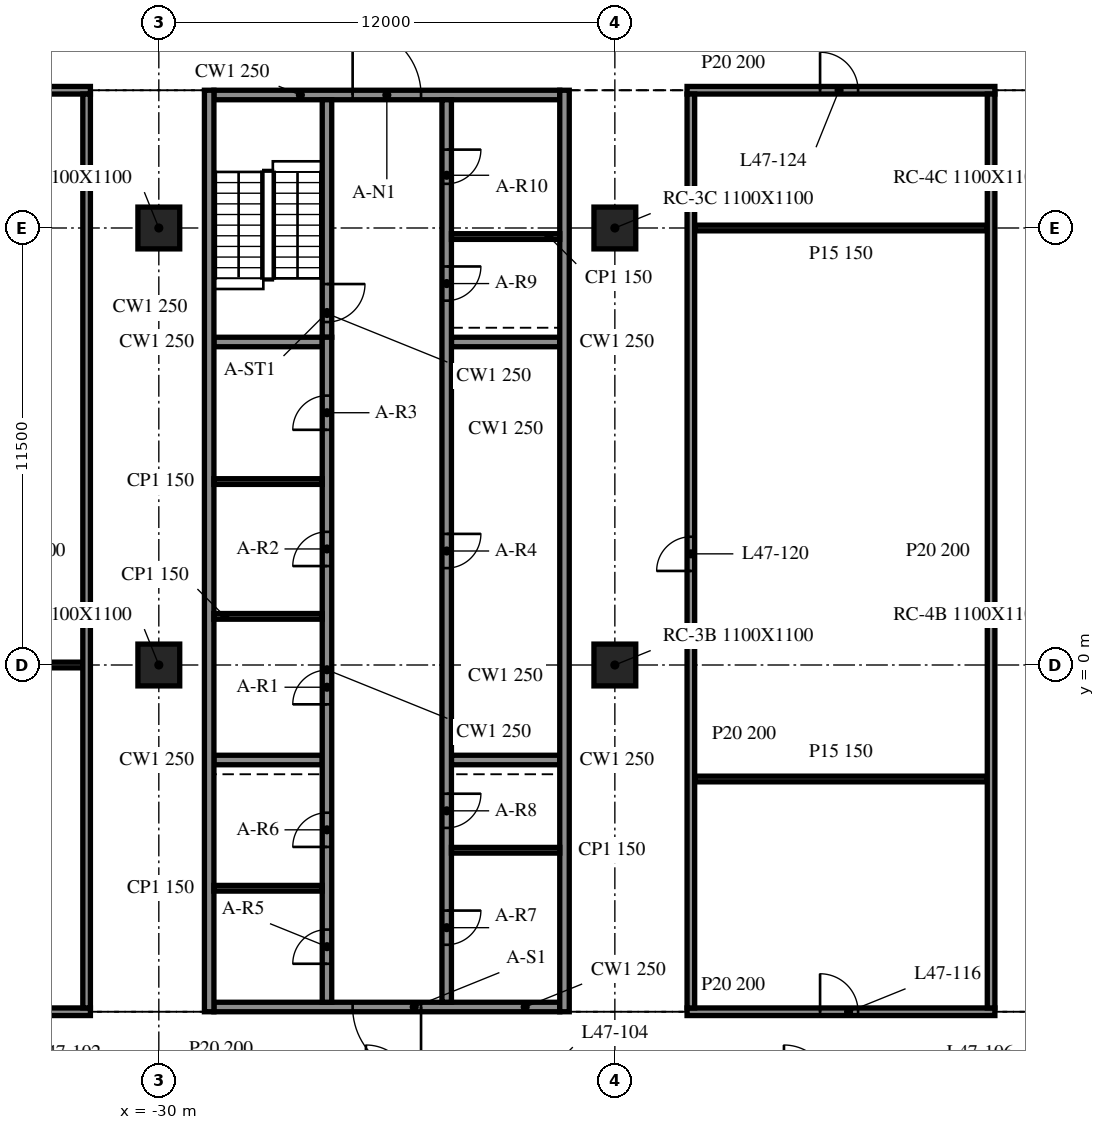
"""IFC4 building model, lengths in metres.
Left out: names, types, materials, properties, quantities, classifications, styles, units other than length and angle.
Written with IfcOpenShell. Run it as: python <this file> out.ifc"""

import sys

from ifc_helpers import new_model, si_unit, direction, frame, frame_2d, origin, origin_2d, place, context, subcontext, project, spatial, rectangle, extrude, element, fill, save


model = new_model("IFC4")
c1 = context("Model", 3, precision=1e-05, world=origin(), true_north=direction((0.0, 1.0)))
c2 = subcontext(c1, "Body", "Model", "MODEL_VIEW")
j1 = project(units=[si_unit("LENGTHUNIT", "METRE"), si_unit("PLANEANGLEUNIT", "RADIAN")], contexts=[c1])
p1 = place(None, origin())
s1 = spatial("IfcSite", under=j1, at=p1, CompositionType="ELEMENT")
p2 = place(p1, origin())
s2 = spatial("IfcBuilding", under=s1, at=p2, CompositionType="ELEMENT")
p3 = place(p2, frame((0.0, 0.0, 197.7)))
s3 = spatial("IfcBuildingStorey", under=s2, at=p3, CompositionType="ELEMENT", Elevation=197.7)
for number, where, z_axis, x_axis in (
    (1, (-30.0, 0.0, -0.34), (0.0, 0.0, 1.0), (1.0, 0.0, 0.0)),
    (2, (-30.0, 11.5, -0.34), (0.0, 0.0, 1.0), (1.0, 0.0, 0.0)),
    (3, (-18.0, 0.0, -0.34), (0.0, 0.0, 1.0), (1.0, 0.0, 0.0)),
    (4, (-18.0, 11.5, -0.34), (0.0, 0.0, 1.0), (1.0, 0.0, 0.0)),
):
    element("IfcColumn", number, at=place(p3, frame(where, z_axis=z_axis, x_axis=x_axis)), inside=s3, PredefinedType="COLUMN", context=c2, shape_type="SweptSolid", body=[
        extrude(rectangle(XDim=1.1, YDim=1.1, at=origin_2d()), origin(), (0.0, 0.0, 1.0), 3.8),
    ])
for number, where, z_axis, x_axis in (
    (5, (-28.675, 15.125, 0.0), (0.0, 0.0, 1.0), (0.0, -1.0, 0.0)),
    (6, (-19.325, -9.125, 0.0), (0.0, 0.0, 1.0), (0.0, 1.0, 0.0)),
):
    element("IfcWall", number, at=place(p3, frame(where, z_axis=z_axis, x_axis=x_axis)), inside=s3, PredefinedType="SOLIDWALL", context=c2, shape_type="SweptSolid", body=[
        extrude(rectangle(XDim=24.25, YDim=0.25, at=frame_2d((12.125, 0.0))), origin(), (0.0, 0.0, 1.0), 3.46),
    ])
p4 = place(p3, frame((-19.45, -9.0, 0.0), z_axis=(0.0, 0.0, 1.0), x_axis=(-1.0, 0.0, 0.0)))
e7 = element("IfcWall", 7, at=p4, inside=s3, PredefinedType="SOLIDWALL", context=c2, shape_type="SweptSolid", body=[
    extrude(rectangle(XDim=9.1, YDim=0.25, at=frame_2d((4.55, 0.0))), origin(), (0.0, 0.0, 1.0), 3.46),
])
p5 = place(p4, frame((3.65, 0.0, 0.0)))
e8 = element("IfcOpeningElement", 8, at=p5, cuts=e7, PredefinedType="OPENING", context=c2, shape_type="SweptSolid", body=[
    extrude(rectangle(XDim=1.8, YDim=2.1, at=frame_2d((0.9, 1.05))), frame((0.0, 0.135, 0.0), z_axis=(0.0, -1.0, 0.0), x_axis=(1.0, 0.0, 0.0)), (0.0, 0.0, 1.0), 0.27),
])
p6 = place(p3, frame((-28.55, 15.0, 0.0), z_axis=(0.0, 0.0, 1.0), x_axis=(1.0, 0.0, 0.0)))
e9 = element("IfcWall", 9, at=p6, inside=s3, PredefinedType="SOLIDWALL", context=c2, shape_type="SweptSolid", body=[
    extrude(rectangle(XDim=9.1, YDim=0.25, at=frame_2d((4.55, 0.0))), origin(), (0.0, 0.0, 1.0), 3.46),
])
p7 = place(p6, frame((3.65, 0.0, 0.0)))
e10 = element("IfcOpeningElement", 10, at=p7, cuts=e9, PredefinedType="OPENING", context=c2, shape_type="SweptSolid", body=[
    extrude(rectangle(XDim=1.8, YDim=2.1, at=frame_2d((0.9, 1.05))), frame((0.0, 0.135, 0.0), z_axis=(0.0, -1.0, 0.0), x_axis=(1.0, 0.0, 0.0)), (0.0, 0.0, 1.0), 0.27),
])
p8 = place(p3, frame((-25.575, -8.875, 0.0), z_axis=(0.0, 0.0, 1.0), x_axis=(0.0, 1.0, 0.0)))
e11 = element("IfcWall", 11, at=p8, inside=s3, PredefinedType="SOLIDWALL", context=c2, shape_type="SweptSolid", body=[
    extrude(rectangle(XDim=17.5, YDim=0.25, at=frame_2d((8.75, 0.0))), origin(), (0.0, 0.0, 1.0), 3.46),
])
p9 = place(p8, frame((7.84, 0.0, 0.0)))
e12 = element("IfcOpeningElement", 12, at=p9, cuts=e11, PredefinedType="OPENING", context=c2, shape_type="SweptSolid", body=[
    extrude(rectangle(XDim=0.9, YDim=2.1, at=frame_2d((0.45, 1.05))), frame((0.0, 0.135, 0.0), z_axis=(0.0, -1.0, 0.0), x_axis=(1.0, 0.0, 0.0)), (0.0, 0.0, 1.0), 0.27),
])
p10 = place(p8, frame((11.479, 0.0, 0.0)))
e13 = element("IfcOpeningElement", 13, at=p10, cuts=e11, PredefinedType="OPENING", context=c2, shape_type="SweptSolid", body=[
    extrude(rectangle(XDim=0.9, YDim=2.1, at=frame_2d((0.45, 1.05))), frame((0.0, 0.135, 0.0), z_axis=(0.0, -1.0, 0.0), x_axis=(1.0, 0.0, 0.0)), (0.0, 0.0, 1.0), 0.27),
])
p11 = place(p8, frame((15.064, 0.0, 0.0)))
e14 = element("IfcOpeningElement", 14, at=p11, cuts=e11, PredefinedType="OPENING", context=c2, shape_type="SweptSolid", body=[
    extrude(rectangle(XDim=0.9, YDim=2.1, at=frame_2d((0.45, 1.05))), frame((0.0, 0.135, 0.0), z_axis=(0.0, -1.0, 0.0), x_axis=(1.0, 0.0, 0.0)), (0.0, 0.0, 1.0), 0.27),
])
p12 = place(p8, frame((1.012, 0.0, 0.0)))
e15 = element("IfcOpeningElement", 15, at=p12, cuts=e11, PredefinedType="OPENING", context=c2, shape_type="SweptSolid", body=[
    extrude(rectangle(XDim=0.9, YDim=2.1, at=frame_2d((0.45, 1.05))), frame((0.0, 0.135, 0.0), z_axis=(0.0, -1.0, 0.0), x_axis=(1.0, 0.0, 0.0)), (0.0, 0.0, 1.0), 0.27),
])
p13 = place(p8, frame((4.087, 0.0, 0.0)))
e16 = element("IfcOpeningElement", 16, at=p13, cuts=e11, PredefinedType="OPENING", context=c2, shape_type="SweptSolid", body=[
    extrude(rectangle(XDim=0.9, YDim=2.1, at=frame_2d((0.45, 1.05))), frame((0.0, 0.135, 0.0), z_axis=(0.0, -1.0, 0.0), x_axis=(1.0, 0.0, 0.0)), (0.0, 0.0, 1.0), 0.27),
])
p14 = place(p3, frame((-25.575, 14.875, 0.0), z_axis=(0.0, 0.0, 1.0), x_axis=(0.0, -1.0, 0.0)))
e17 = element("IfcWall", 17, at=p14, inside=s3, PredefinedType="SOLIDWALL", context=c2, shape_type="SweptSolid", body=[
    extrude(rectangle(XDim=6.25, YDim=0.25, at=frame_2d((3.125, 0.0))), origin(), (0.0, 0.0, 1.0), 3.46),
])
p15 = place(p14, frame((4.85, 0.0, 0.0)))
e18 = element("IfcOpeningElement", 18, at=p15, cuts=e17, PredefinedType="OPENING", context=c2, shape_type="SweptSolid", body=[
    extrude(rectangle(XDim=1.0, YDim=2.1, at=frame_2d((0.5, 1.05))), frame((0.0, 0.135, 0.0), z_axis=(0.0, -1.0, 0.0), x_axis=(1.0, 0.0, 0.0)), (0.0, 0.0, 1.0), 0.27),
])
p16 = place(p3, frame((-22.425, 14.875, 0.0), z_axis=(0.0, 0.0, 1.0), x_axis=(0.0, -1.0, 0.0)))
e19 = element("IfcWall", 19, at=p16, inside=s3, PredefinedType="SOLIDWALL", context=c2, shape_type="SweptSolid", body=[
    extrude(rectangle(XDim=23.75, YDim=0.25, at=frame_2d((11.875, 0.0))), origin(), (0.0, 0.0, 1.0), 3.46),
])
p17 = place(p16, frame((11.425, 0.0, 0.0)))
e20 = element("IfcOpeningElement", 20, at=p17, cuts=e19, PredefinedType="OPENING", context=c2, shape_type="SweptSolid", body=[
    extrude(rectangle(XDim=0.9, YDim=2.1, at=frame_2d((0.45, 1.05))), frame((0.0, 0.135, 0.0), z_axis=(0.0, -1.0, 0.0), x_axis=(1.0, 0.0, 0.0)), (0.0, 0.0, 1.0), 0.27),
])
p18 = place(p16, frame((21.337, 0.0, 0.0)))
e21 = element("IfcOpeningElement", 21, at=p18, cuts=e19, PredefinedType="OPENING", context=c2, shape_type="SweptSolid", body=[
    extrude(rectangle(XDim=0.9, YDim=2.1, at=frame_2d((0.45, 1.05))), frame((0.0, 0.135, 0.0), z_axis=(0.0, -1.0, 0.0), x_axis=(1.0, 0.0, 0.0)), (0.0, 0.0, 1.0), 0.27),
])
p19 = place(p16, frame((18.262, 0.0, 0.0)))
e22 = element("IfcOpeningElement", 22, at=p19, cuts=e19, PredefinedType="OPENING", context=c2, shape_type="SweptSolid", body=[
    extrude(rectangle(XDim=0.9, YDim=2.1, at=frame_2d((0.45, 1.05))), frame((0.0, 0.135, 0.0), z_axis=(0.0, -1.0, 0.0), x_axis=(1.0, 0.0, 0.0)), (0.0, 0.0, 1.0), 0.27),
])
p20 = place(p16, frame((4.387, 0.0, 0.0)))
e23 = element("IfcOpeningElement", 23, at=p20, cuts=e19, PredefinedType="OPENING", context=c2, shape_type="SweptSolid", body=[
    extrude(rectangle(XDim=0.9, YDim=2.1, at=frame_2d((0.45, 1.05))), frame((0.0, 0.135, 0.0), z_axis=(0.0, -1.0, 0.0), x_axis=(1.0, 0.0, 0.0)), (0.0, 0.0, 1.0), 0.27),
])
p21 = place(p16, frame((1.312, 0.0, 0.0)))
e24 = element("IfcOpeningElement", 24, at=p21, cuts=e19, PredefinedType="OPENING", context=c2, shape_type="SweptSolid", body=[
    extrude(rectangle(XDim=0.9, YDim=2.1, at=frame_2d((0.45, 1.05))), frame((0.0, 0.135, 0.0), z_axis=(0.0, -1.0, 0.0), x_axis=(1.0, 0.0, 0.0)), (0.0, 0.0, 1.0), 0.27),
])
for number, where, z_axis, x_axis in (
    (25, (-28.55, -2.5, 0.0), (0.0, 0.0, 1.0), (1.0, 0.0, 0.0)),
    (26, (-28.55, 8.5, 0.0), (0.0, 0.0, 1.0), (1.0, 0.0, 0.0)),
    (27, (-22.3, -2.5, 0.0), (0.0, 0.0, 1.0), (1.0, 0.0, 0.0)),
    (28, (-22.3, 8.5, 0.0), (0.0, 0.0, 1.0), (1.0, 0.0, 0.0)),
):
    element("IfcWall", number, at=place(p3, frame(where, z_axis=z_axis, x_axis=x_axis)), inside=s3, PredefinedType="SOLIDWALL", context=c2, shape_type="SweptSolid", body=[
        extrude(rectangle(XDim=2.85, YDim=0.25, at=frame_2d((1.425, 0.0))), origin(), (0.0, 0.0, 1.0), 3.46),
    ])
for number, where, z_axis, x_axis in (
    (29, (-28.55, 1.28, 0.0), (0.0, 0.0, 1.0), (1.0, 0.0, 0.0)),
    (30, (-28.55, 4.827, 0.0), (0.0, 0.0, 1.0), (1.0, 0.0, 0.0)),
    (31, (-28.55, -5.875, 0.0), (0.0, 0.0, 1.0), (1.0, 0.0, 0.0)),
    (32, (-22.3, -4.875, 0.0), (0.0, 0.0, 1.0), (1.0, 0.0, 0.0)),
    (33, (-22.3, 11.275, 0.0), (0.0, 0.0, 1.0), (1.0, 0.0, 0.0)),
):
    element("IfcWall", number, at=place(p3, frame(where, z_axis=z_axis, x_axis=x_axis)), inside=s3, PredefinedType="PARTITIONING", context=c2, shape_type="SweptSolid", body=[
        extrude(rectangle(XDim=2.85, YDim=0.15, at=frame_2d((1.425, 0.0))), origin(), (0.0, 0.0, 1.0), 3.46),
    ])
p22 = place(p3, frame((-41.975, -9.125, 0.0), z_axis=(0.0, 0.0, 1.0), x_axis=(1.0, 0.0, 0.0)))
e34 = element("IfcWall", 34, at=p22, inside=s3, PredefinedType="PARTITIONING", context=c2, shape_type="SweptSolid", body=[
    extrude(rectangle(XDim=10.175, YDim=0.2, at=frame_2d((5.087, 0.0))), origin(), (0.0, 0.0, 1.0), 3.46),
])
p23 = place(p22, frame((4.5, 0.0, 0.0)))
e35 = element("IfcOpeningElement", 35, at=p23, cuts=e34, PredefinedType="OPENING", context=c2, shape_type="SweptSolid", body=[
    extrude(rectangle(XDim=1.2, YDim=2.1, at=frame_2d((0.6, 1.05))), frame((0.0, 0.11, 0.0), z_axis=(0.0, -1.0, 0.0), x_axis=(1.0, 0.0, 0.0)), (0.0, 0.0, 1.0), 0.22),
])
p24 = place(p3, frame((-16.1, -9.125, 0.0), z_axis=(0.0, 0.0, 1.0), x_axis=(1.0, 0.0, 0.0)))
e36 = element("IfcWall", 36, at=p24, inside=s3, PredefinedType="PARTITIONING", context=c2, shape_type="SweptSolid", body=[
    extrude(rectangle(XDim=8.1, YDim=0.2, at=frame_2d((4.05, 0.0))), origin(), (0.0, 0.0, 1.0), 3.46),
])
p25 = place(p24, frame((3.5, 0.0, 0.0)))
e37 = element("IfcOpeningElement", 37, at=p25, cuts=e36, PredefinedType="OPENING", context=c2, shape_type="SweptSolid", body=[
    extrude(rectangle(XDim=1.0, YDim=2.1, at=frame_2d((0.5, 1.05))), frame((0.0, 0.11, 0.0), z_axis=(0.0, -1.0, 0.0), x_axis=(1.0, 0.0, 0.0)), (0.0, 0.0, 1.0), 0.22),
])
p26 = place(p3, frame((-15.9, -3.0, 0.0), z_axis=(0.0, 0.0, 1.0), x_axis=(1.0, 0.0, 0.0)))
e38 = element("IfcWall", 38, at=p26, inside=s3, PredefinedType="PARTITIONING", context=c2, shape_type="SweptSolid", body=[
    extrude(rectangle(XDim=7.7, YDim=0.15, at=frame_2d((3.85, 0.0))), origin(), (0.0, 0.0, 1.0), 3.46),
])
p27 = place(p3, frame((-41.45, 0.0, 0.0), z_axis=(0.0, 0.0, 1.0), x_axis=(1.0, 0.0, 0.0)))
e39 = element("IfcWall", 39, at=p27, inside=s3, PredefinedType="PARTITIONING", context=c2, shape_type="SweptSolid", body=[
    extrude(rectangle(XDim=9.45, YDim=0.15, at=frame_2d((4.725, 0.0))), origin(), (0.0, 0.0, 1.0), 3.46),
])
p28 = place(p3, frame((-15.9, 11.5, 0.0), z_axis=(0.0, 0.0, 1.0), x_axis=(1.0, 0.0, 0.0)))
e40 = element("IfcWall", 40, at=p28, inside=s3, PredefinedType="PARTITIONING", context=c2, shape_type="SweptSolid", body=[
    extrude(rectangle(XDim=7.7, YDim=0.15, at=frame_2d((3.85, 0.0))), origin(), (0.0, 0.0, 1.0), 3.46),
])
p29 = place(p3, frame((-41.975, 15.125, 0.0), z_axis=(0.0, 0.0, 1.0), x_axis=(1.0, 0.0, 0.0)))
e41 = element("IfcWall", 41, at=p29, inside=s3, PredefinedType="PARTITIONING", context=c2, shape_type="SweptSolid", body=[
    extrude(rectangle(XDim=10.175, YDim=0.2, at=frame_2d((5.087, 0.0))), origin(), (0.0, 0.0, 1.0), 3.46),
])
p30 = place(p29, frame((4.5, 0.0, 0.0)))
e42 = element("IfcOpeningElement", 42, at=p30, cuts=e41, PredefinedType="OPENING", context=c2, shape_type="SweptSolid", body=[
    extrude(rectangle(XDim=1.0, YDim=2.1, at=frame_2d((0.5, 1.05))), frame((0.0, 0.11, 0.0), z_axis=(0.0, -1.0, 0.0), x_axis=(1.0, 0.0, 0.0)), (0.0, 0.0, 1.0), 0.22),
])
p31 = place(p3, frame((-16.1, 15.125, 0.0), z_axis=(0.0, 0.0, 1.0), x_axis=(1.0, 0.0, 0.0)))
e43 = element("IfcWall", 43, at=p31, inside=s3, PredefinedType="PARTITIONING", context=c2, shape_type="SweptSolid", body=[
    extrude(rectangle(XDim=8.1, YDim=0.2, at=frame_2d((4.05, 0.0))), origin(), (0.0, 0.0, 1.0), 3.46),
])
p32 = place(p31, frame((3.5, 0.0, 0.0)))
e44 = element("IfcOpeningElement", 44, at=p32, cuts=e43, PredefinedType="OPENING", context=c2, shape_type="SweptSolid", body=[
    extrude(rectangle(XDim=1.0, YDim=2.1, at=frame_2d((0.5, 1.05))), frame((0.0, 0.11, 0.0), z_axis=(0.0, -1.0, 0.0), x_axis=(1.0, 0.0, 0.0)), (0.0, 0.0, 1.0), 0.22),
])
p33 = place(p3, frame((-31.9, -9.025, 0.0), z_axis=(0.0, 0.0, 1.0), x_axis=(0.0, 1.0, 0.0)))
e45 = element("IfcWall", 45, at=p33, inside=s3, PredefinedType="PARTITIONING", context=c2, shape_type="SweptSolid", body=[
    extrude(rectangle(XDim=24.05, YDim=0.2, at=frame_2d((12.025, 0.0))), origin(), (0.0, 0.0, 1.0), 3.46),
])
p34 = place(p3, frame((-16.0, -9.025, 0.0), z_axis=(0.0, 0.0, 1.0), x_axis=(0.0, 1.0, 0.0)))
e46 = element("IfcWall", 46, at=p34, inside=s3, PredefinedType="PARTITIONING", context=c2, shape_type="SweptSolid", body=[
    extrude(rectangle(XDim=24.05, YDim=0.2, at=frame_2d((12.025, 0.0))), origin(), (0.0, 0.0, 1.0), 3.46),
])
p35 = place(p34, frame((11.5, 0.0, 0.0)))
e47 = element("IfcOpeningElement", 47, at=p35, cuts=e46, PredefinedType="OPENING", context=c2, shape_type="SweptSolid", body=[
    extrude(rectangle(XDim=0.9, YDim=2.1, at=frame_2d((0.45, 1.05))), frame((0.0, 0.11, 0.0), z_axis=(0.0, -1.0, 0.0), x_axis=(1.0, 0.0, 0.0)), (0.0, 0.0, 1.0), 0.22),
])
p36 = place(p3, frame((-8.1, -9.025, 0.0), z_axis=(0.0, 0.0, 1.0), x_axis=(0.0, 1.0, 0.0)))
e48 = element("IfcWall", 48, at=p36, inside=s3, PredefinedType="PARTITIONING", context=c2, shape_type="SweptSolid", body=[
    extrude(rectangle(XDim=24.05, YDim=0.2, at=frame_2d((12.025, 0.0))), origin(), (0.0, 0.0, 1.0), 3.46),
])
p37 = place(p5, origin())
e49 = element("IfcDoor", 49, at=p37, inside=s3, OperationType="DOUBLE_DOOR_SINGLE_SWING", PredefinedType="DOOR", context=c2, shape_type="SweptSolid", body=[
    extrude(rectangle(XDim=1.8, YDim=2.1, at=frame_2d((0.9, 1.05))), frame((0.0, 0.025, 0.0), z_axis=(0.0, -1.0, 0.0), x_axis=(1.0, 0.0, 0.0)), (0.0, 0.0, 1.0), 0.05),
])
fill(e8, e49)
p38 = place(p7, origin())
e50 = element("IfcDoor", 50, at=p38, inside=s3, OperationType="DOUBLE_DOOR_SINGLE_SWING", PredefinedType="DOOR", context=c2, shape_type="SweptSolid", body=[
    extrude(rectangle(XDim=1.8, YDim=2.1, at=frame_2d((0.9, 1.05))), frame((0.0, 0.025, 0.0), z_axis=(0.0, -1.0, 0.0), x_axis=(1.0, 0.0, 0.0)), (0.0, 0.0, 1.0), 0.05),
])
fill(e10, e50)
p39 = place(p9, origin())
e51 = element("IfcDoor", 51, at=p39, inside=s3, OperationType="SINGLE_SWING_LEFT", PredefinedType="DOOR", context=c2, shape_type="SweptSolid", body=[
    extrude(rectangle(XDim=0.9, YDim=2.1, at=frame_2d((0.45, 1.05))), frame((0.0, 0.025, 0.0), z_axis=(0.0, -1.0, 0.0), x_axis=(1.0, 0.0, 0.0)), (0.0, 0.0, 1.0), 0.05),
])
fill(e12, e51)
p40 = place(p10, origin())
e52 = element("IfcDoor", 52, at=p40, inside=s3, OperationType="SINGLE_SWING_RIGHT", PredefinedType="DOOR", context=c2, shape_type="SweptSolid", body=[
    extrude(rectangle(XDim=0.9, YDim=2.1, at=frame_2d((0.45, 1.05))), frame((0.0, 0.025, 0.0), z_axis=(0.0, -1.0, 0.0), x_axis=(1.0, 0.0, 0.0)), (0.0, 0.0, 1.0), 0.05),
])
fill(e13, e52)
p41 = place(p11, origin())
e53 = element("IfcDoor", 53, at=p41, inside=s3, OperationType="SINGLE_SWING_LEFT", PredefinedType="DOOR", context=c2, shape_type="SweptSolid", body=[
    extrude(rectangle(XDim=0.9, YDim=2.1, at=frame_2d((0.45, 1.05))), frame((0.0, 0.025, 0.0), z_axis=(0.0, -1.0, 0.0), x_axis=(1.0, 0.0, 0.0)), (0.0, 0.0, 1.0), 0.05),
])
fill(e14, e53)
p42 = place(p17, origin())
e54 = element("IfcDoor", 54, at=p42, inside=s3, OperationType="SINGLE_SWING_RIGHT", PredefinedType="DOOR", context=c2, shape_type="SweptSolid", body=[
    extrude(rectangle(XDim=0.9, YDim=2.1, at=frame_2d((0.45, 1.05))), frame((0.0, 0.025, 0.0), z_axis=(0.0, -1.0, 0.0), x_axis=(1.0, 0.0, 0.0)), (0.0, 0.0, 1.0), 0.05),
])
fill(e20, e54)
p43 = place(p12, origin())
e55 = element("IfcDoor", 55, at=p43, inside=s3, OperationType="SINGLE_SWING_LEFT", PredefinedType="DOOR", context=c2, shape_type="SweptSolid", body=[
    extrude(rectangle(XDim=0.9, YDim=2.1, at=frame_2d((0.45, 1.05))), frame((0.0, 0.025, 0.0), z_axis=(0.0, -1.0, 0.0), x_axis=(1.0, 0.0, 0.0)), (0.0, 0.0, 1.0), 0.05),
])
fill(e15, e55)
p44 = place(p13, origin())
e56 = element("IfcDoor", 56, at=p44, inside=s3, OperationType="SINGLE_SWING_RIGHT", PredefinedType="DOOR", context=c2, shape_type="SweptSolid", body=[
    extrude(rectangle(XDim=0.9, YDim=2.1, at=frame_2d((0.45, 1.05))), frame((0.0, 0.025, 0.0), z_axis=(0.0, -1.0, 0.0), x_axis=(1.0, 0.0, 0.0)), (0.0, 0.0, 1.0), 0.05),
])
fill(e16, e56)
p45 = place(p18, origin())
e57 = element("IfcDoor", 57, at=p45, inside=s3, OperationType="SINGLE_SWING_LEFT", PredefinedType="DOOR", context=c2, shape_type="SweptSolid", body=[
    extrude(rectangle(XDim=0.9, YDim=2.1, at=frame_2d((0.45, 1.05))), frame((0.0, 0.025, 0.0), z_axis=(0.0, -1.0, 0.0), x_axis=(1.0, 0.0, 0.0)), (0.0, 0.0, 1.0), 0.05),
])
fill(e21, e57)
p46 = place(p19, origin())
e58 = element("IfcDoor", 58, at=p46, inside=s3, OperationType="SINGLE_SWING_RIGHT", PredefinedType="DOOR", context=c2, shape_type="SweptSolid", body=[
    extrude(rectangle(XDim=0.9, YDim=2.1, at=frame_2d((0.45, 1.05))), frame((0.0, 0.025, 0.0), z_axis=(0.0, -1.0, 0.0), x_axis=(1.0, 0.0, 0.0)), (0.0, 0.0, 1.0), 0.05),
])
fill(e22, e58)
p47 = place(p20, origin())
e59 = element("IfcDoor", 59, at=p47, inside=s3, OperationType="SINGLE_SWING_LEFT", PredefinedType="DOOR", context=c2, shape_type="SweptSolid", body=[
    extrude(rectangle(XDim=0.9, YDim=2.1, at=frame_2d((0.45, 1.05))), frame((0.0, 0.025, 0.0), z_axis=(0.0, -1.0, 0.0), x_axis=(1.0, 0.0, 0.0)), (0.0, 0.0, 1.0), 0.05),
])
fill(e23, e59)
p48 = place(p21, origin())
e60 = element("IfcDoor", 60, at=p48, inside=s3, OperationType="SINGLE_SWING_RIGHT", PredefinedType="DOOR", context=c2, shape_type="SweptSolid", body=[
    extrude(rectangle(XDim=0.9, YDim=2.1, at=frame_2d((0.45, 1.05))), frame((0.0, 0.025, 0.0), z_axis=(0.0, -1.0, 0.0), x_axis=(1.0, 0.0, 0.0)), (0.0, 0.0, 1.0), 0.05),
])
fill(e24, e60)
p49 = place(p15, origin())
e61 = element("IfcDoor", 61, at=p49, inside=s3, OperationType="SINGLE_SWING_LEFT", PredefinedType="DOOR", context=c2, shape_type="SweptSolid", body=[
    extrude(rectangle(XDim=1.0, YDim=2.1, at=frame_2d((0.5, 1.05))), frame((0.0, 0.025, 0.0), z_axis=(0.0, -1.0, 0.0), x_axis=(1.0, 0.0, 0.0)), (0.0, 0.0, 1.0), 0.05),
])
fill(e18, e61)
p50 = place(p25, origin())
e62 = element("IfcDoor", 62, at=p50, inside=s3, OperationType="SINGLE_SWING_LEFT", PredefinedType="DOOR", context=c2, shape_type="SweptSolid", body=[
    extrude(rectangle(XDim=1.0, YDim=2.1, at=frame_2d((0.5, 1.05))), frame((0.0, 0.025, 0.0), z_axis=(0.0, -1.0, 0.0), x_axis=(1.0, 0.0, 0.0)), (0.0, 0.0, 1.0), 0.05),
])
fill(e37, e62)
p51 = place(p35, origin())
e63 = element("IfcDoor", 63, at=p51, inside=s3, OperationType="SINGLE_SWING_RIGHT", PredefinedType="DOOR", context=c2, shape_type="SweptSolid", body=[
    extrude(rectangle(XDim=0.9, YDim=2.1, at=frame_2d((0.45, 1.05))), frame((0.0, 0.025, 0.0), z_axis=(0.0, -1.0, 0.0), x_axis=(1.0, 0.0, 0.0)), (0.0, 0.0, 1.0), 0.05),
])
fill(e47, e63)
p52 = place(p32, origin())
e64 = element("IfcDoor", 64, at=p52, inside=s3, OperationType="SINGLE_SWING_RIGHT", PredefinedType="DOOR", context=c2, shape_type="SweptSolid", body=[
    extrude(rectangle(XDim=1.0, YDim=2.1, at=frame_2d((0.5, 1.05))), frame((0.0, 0.025, 0.0), z_axis=(0.0, -1.0, 0.0), x_axis=(1.0, 0.0, 0.0)), (0.0, 0.0, 1.0), 0.05),
])
fill(e44, e64)
save(model, sys.argv[1])
